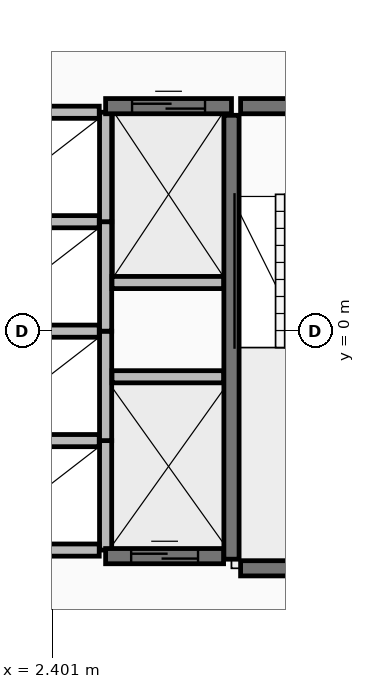
"""IFC4 building model, lengths in metres.
Left out: names, types, materials, properties, quantities, classifications, styles, units other than length and angle.
Written with IfcOpenShell. Run it as: python <this file> out.ifc"""

import sys

from ifc_helpers import new_model, si_unit, direction, frame, frame_2d, origin, place, context, subcontext, project, spatial, rectangle, extrude, element, fill, save


model = new_model("IFC4")
c1 = context("Model", 3, precision=1e-05, world=origin(), true_north=direction((0.0, 1.0)))
c2 = subcontext(c1, "Body", "Model", "MODEL_VIEW")
j1 = project(units=[si_unit("LENGTHUNIT", "METRE"), si_unit("PLANEANGLEUNIT", "RADIAN")], contexts=[c1])
p1 = place(None, origin())
s1 = spatial("IfcSite", under=j1, at=p1, CompositionType="ELEMENT")
p2 = place(p1, origin())
s2 = spatial("IfcBuilding", under=s1, at=p2, CompositionType="ELEMENT")
p3 = place(p2, frame((0.0, 0.0, 31.8)))
s3 = spatial("IfcBuildingStorey", under=s2, at=p3, CompositionType="ELEMENT", Elevation=31.8)
p4 = place(p3, frame((5.35, -3.75, 0.0), z_axis=(0.0, 0.0, 1.0), x_axis=(0.0, 1.0, 0.0)))
e1 = element("IfcWall", 1, at=p4, inside=s3, PredefinedType="SHEAR", context=c2, shape_type="SweptSolid", body=[
    extrude(rectangle(XDim=7.3, YDim=0.25, at=frame_2d((3.65, 0.0))), origin(), (0.0, 0.0, 1.0), 3.275),
])
p5 = place(p3, frame((5.5, 3.7, 0.0), z_axis=(0.0, 0.0, 1.0), x_axis=(1.0, 0.0, 0.0)))
e2 = element("IfcWall", 2, at=p5, inside=s3, PredefinedType="SHEAR", context=c2, shape_type="SweptSolid", body=[
    extrude(rectangle(XDim=3.0, YDim=0.25, at=frame_2d((1.5, 0.0))), origin(), (0.0, 0.0, 1.0), 3.275),
])
p6 = place(p5, frame((0.95, 0.0, 0.0)))
e3 = element("IfcOpeningElement", 3, at=p6, cuts=e2, PredefinedType="OPENING", context=c2, shape_type="SweptSolid", body=[
    extrude(rectangle(XDim=1.1, YDim=2.15, at=frame_2d((0.55, 1.075))), frame((0.0, 0.135, 0.0), z_axis=(0.0, -1.0, 0.0), x_axis=(1.0, 0.0, 0.0)), (0.0, 0.0, 1.0), 0.27),
])
p7 = place(p3, frame((5.5, -3.9, 0.0), z_axis=(0.0, 0.0, 1.0), x_axis=(1.0, 0.0, 0.0)))
e4 = element("IfcWall", 4, at=p7, inside=s3, PredefinedType="SHEAR", context=c2, shape_type="SweptSolid", body=[
    extrude(rectangle(XDim=3.0, YDim=0.25, at=frame_2d((1.5, 0.0))), origin(), (0.0, 0.0, 1.0), 3.275),
])
p8 = place(p3, frame((3.28, -3.6, 0.0), z_axis=(0.0, 0.0, 1.0), x_axis=(0.0, 1.0, 0.0)))
e5 = element("IfcWall", 5, at=p8, inside=s3, PredefinedType="PARTITIONING", context=c2, shape_type="SweptSolid", body=[
    extrude(rectangle(XDim=1.8, YDim=0.2, at=frame_2d((0.9, 0.0))), origin(), (0.0, 0.0, 1.0), 3.275),
])
for number, where, z_axis, x_axis in (
    (6, (1.13, -3.6, 0.0), (0.0, 0.0, 1.0), (1.0, 0.0, 0.0)),
    (7, (1.13, -1.8, 0.0), (0.0, 0.0, 1.0), (1.0, 0.0, 0.0)),
):
    element("IfcWall", number, at=place(p3, frame(where, z_axis=z_axis, x_axis=x_axis)), inside=s3, PredefinedType="PARTITIONING", context=c2, shape_type="SweptSolid", body=[
        extrude(rectangle(XDim=2.045, YDim=0.2, at=frame_2d((1.022, 0.0))), origin(), (0.0, 0.0, 1.0), 3.275),
    ])
p9 = place(p3, frame((3.28, -1.8, 0.0), z_axis=(0.0, 0.0, 1.0), x_axis=(0.0, 1.0, 0.0)))
e8 = element("IfcWall", 8, at=p9, inside=s3, PredefinedType="PARTITIONING", context=c2, shape_type="SweptSolid", body=[
    extrude(rectangle(XDim=1.8, YDim=0.2, at=frame_2d((0.9, 0.0))), origin(), (0.0, 0.0, 1.0), 3.275),
])
p10 = place(p3, frame((1.13, 0.0, 0.0), z_axis=(0.0, 0.0, 1.0), x_axis=(1.0, 0.0, 0.0)))
e9 = element("IfcWall", 9, at=p10, inside=s3, PredefinedType="PARTITIONING", context=c2, shape_type="SweptSolid", body=[
    extrude(rectangle(XDim=2.045, YDim=0.2, at=frame_2d((1.022, 0.0))), origin(), (0.0, 0.0, 1.0), 3.275),
])
p11 = place(p3, frame((3.28, 0.0, 0.0), z_axis=(0.0, 0.0, 1.0), x_axis=(0.0, 1.0, 0.0)))
e10 = element("IfcWall", 10, at=p11, inside=s3, PredefinedType="PARTITIONING", context=c2, shape_type="SweptSolid", body=[
    extrude(rectangle(XDim=1.8, YDim=0.2, at=frame_2d((0.9, 0.0))), origin(), (0.0, 0.0, 1.0), 3.275),
])
p12 = place(p3, frame((1.13, 1.8, 0.0), z_axis=(0.0, 0.0, 1.0), x_axis=(1.0, 0.0, 0.0)))
e11 = element("IfcWall", 11, at=p12, inside=s3, PredefinedType="PARTITIONING", context=c2, shape_type="SweptSolid", body=[
    extrude(rectangle(XDim=2.045, YDim=0.2, at=frame_2d((1.022, 0.0))), origin(), (0.0, 0.0, 1.0), 3.275),
])
p13 = place(p3, frame((3.28, 1.8, 0.0), z_axis=(0.0, 0.0, 1.0), x_axis=(0.0, 1.0, 0.0)))
e12 = element("IfcWall", 12, at=p13, inside=s3, PredefinedType="PARTITIONING", context=c2, shape_type="SweptSolid", body=[
    extrude(rectangle(XDim=1.8, YDim=0.2, at=frame_2d((0.9, 0.0))), origin(), (0.0, 0.0, 1.0), 3.275),
])
p14 = place(p3, frame((1.13, 3.6, 0.0), z_axis=(0.0, 0.0, 1.0), x_axis=(1.0, 0.0, 0.0)))
e13 = element("IfcWall", 13, at=p14, inside=s3, PredefinedType="PARTITIONING", context=c2, shape_type="SweptSolid", body=[
    extrude(rectangle(XDim=2.045, YDim=0.2, at=frame_2d((1.022, 0.0))), origin(), (0.0, 0.0, 1.0), 2.47),
])
p15 = place(p3, frame((3.28, 3.7, 0.0), z_axis=(0.0, 0.0, 1.0), x_axis=(1.0, 0.0, 0.0)))
e14 = element("IfcWall", 14, at=p15, inside=s3, PredefinedType="SHEAR", context=c2, shape_type="SweptSolid", body=[
    extrude(rectangle(XDim=2.07, YDim=0.25, at=frame_2d((1.035, 0.0))), origin(), (0.0, 0.0, 1.0), 3.275),
])
p16 = place(p15, frame((0.435, 0.0, 0.0)))
e15 = element("IfcOpeningElement", 15, at=p16, cuts=e14, PredefinedType="OPENING", context=c2, shape_type="SweptSolid", body=[
    extrude(rectangle(XDim=1.2, YDim=2.2, at=frame_2d((0.6, 1.1))), frame((0.0, 0.135, 0.0), z_axis=(0.0, -1.0, 0.0), x_axis=(1.0, 0.0, 0.0)), (0.0, 0.0, 1.0), 0.27),
])
p17 = place(p3, frame((3.385, 0.8, 0.0), z_axis=(0.0, 0.0, 1.0), x_axis=(1.0, 0.0, 0.0)))
e16 = element("IfcWall", 16, at=p17, inside=s3, PredefinedType="PARTITIONING", context=c2, shape_type="SweptSolid", body=[
    extrude(rectangle(XDim=1.835, YDim=0.2, at=frame_2d((0.917, 0.0))), origin(), (0.0, 0.0, 1.0), 3.275),
])
p18 = place(p3, frame((3.28, -3.7, 0.0), z_axis=(0.0, 0.0, 1.0), x_axis=(1.0, 0.0, 0.0)))
e17 = element("IfcWall", 17, at=p18, inside=s3, PredefinedType="SHEAR", context=c2, shape_type="SweptSolid", body=[
    extrude(rectangle(XDim=1.94, YDim=0.25, at=frame_2d((0.97, 0.0))), origin(), (0.0, 0.0, 1.0), 3.275),
])
p19 = place(p18, frame((0.42, 0.0, 0.0)))
e18 = element("IfcOpeningElement", 18, at=p19, cuts=e17, PredefinedType="OPENING", context=c2, shape_type="SweptSolid", body=[
    extrude(rectangle(XDim=1.1, YDim=2.2, at=frame_2d((0.55, 1.1))), frame((0.0, 0.135, 0.0), z_axis=(0.0, -1.0, 0.0), x_axis=(1.0, 0.0, 0.0)), (0.0, 0.0, 1.0), 0.27),
])
p20 = place(p3, frame((3.385, -0.75, 0.0), z_axis=(0.0, 0.0, 1.0), x_axis=(1.0, 0.0, 0.0)))
e19 = element("IfcWall", 19, at=p20, inside=s3, PredefinedType="PARTITIONING", context=c2, shape_type="SweptSolid", body=[
    extrude(rectangle(XDim=1.835, YDim=0.2, at=frame_2d((0.917, 0.0))), origin(), (0.0, 0.0, 1.0), 3.275),
])
p21 = place(p16, origin())
e20 = element("IfcDoor", 20, at=p21, inside=s3, OperationType="SLIDING_TO_RIGHT", PredefinedType="DOOR", context=c2, shape_type="SweptSolid", body=[
    extrude(rectangle(XDim=1.2, YDim=2.2, at=frame_2d((0.6, 1.1))), frame((0.0, 0.025, 0.0), z_axis=(0.0, -1.0, 0.0), x_axis=(1.0, 0.0, 0.0)), (0.0, 0.0, 1.0), 0.05),
])
fill(e15, e20)
p22 = place(p19, origin())
e21 = element("IfcDoor", 21, at=p22, inside=s3, OperationType="SLIDING_TO_LEFT", PredefinedType="DOOR", context=c2, shape_type="SweptSolid", body=[
    extrude(rectangle(XDim=1.1, YDim=2.2, at=frame_2d((0.55, 1.1))), frame((0.0, 0.025, 0.0), z_axis=(0.0, -1.0, 0.0), x_axis=(1.0, 0.0, 0.0)), (0.0, 0.0, 1.0), 0.05),
])
fill(e18, e21)
save(model, sys.argv[1])
